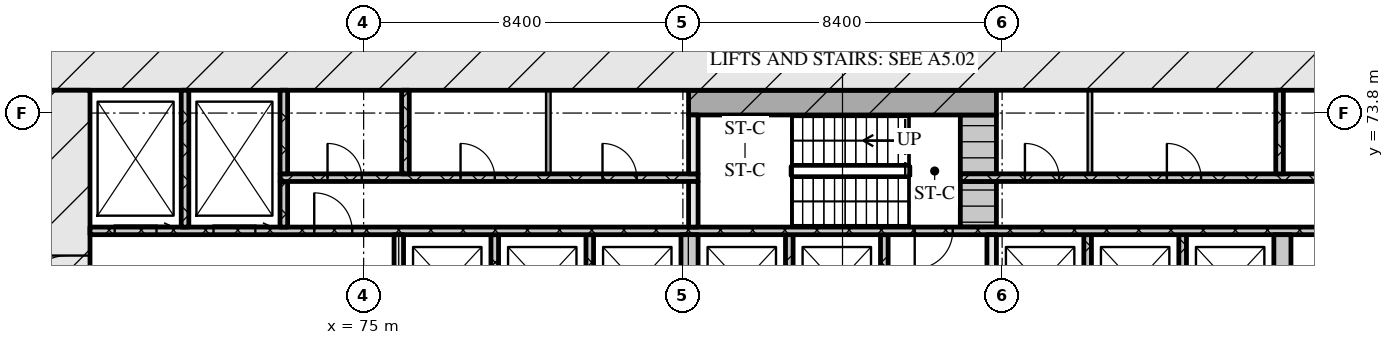
"""IFC4 building model, lengths in metres.
Left out: names, types, materials, properties, quantities, classifications, styles, units other than length and angle.
Written with IfcOpenShell. Run it as: python <this file> out.ifc"""

import sys

from ifc_helpers import new_model, si_unit, direction, frame, frame_2d, origin, place, context, subcontext, project, spatial, rectangle, extrude, element, fill, save


model = new_model("IFC4")
c1 = context("Model", 3, precision=1e-05, world=origin(), true_north=direction((0.0, 1.0)))
c2 = subcontext(c1, "Body", "Model", "MODEL_VIEW")
j1 = project(units=[si_unit("LENGTHUNIT", "METRE"), si_unit("PLANEANGLEUNIT", "RADIAN")], contexts=[c1])
p1 = place(None, origin())
s1 = spatial("IfcSite", under=j1, at=p1, CompositionType="ELEMENT")
p2 = place(p1, origin())
s2 = spatial("IfcBuilding", under=s1, at=p2, CompositionType="ELEMENT")
p3 = place(p2, origin())
s3 = spatial("IfcBuildingStorey", under=s2, at=p3, CompositionType="ELEMENT", Elevation=0.0)
p4 = place(p3, frame((66.6, 75.0, 0.0), z_axis=(0.0, 0.0, 1.0), x_axis=(1.0, 0.0, 0.0)))
e1 = element("IfcWall", 1, at=p4, inside=s3, PredefinedType="SOLIDWALL", context=c2, shape_type="SweptSolid", body=[
    extrude(rectangle(XDim=42.0, YDim=1.2, at=frame_2d((21.0, 0.0))), origin(), (0.0, 0.0, 1.0), 8.7),
])
p5 = place(p3, frame((67.2, 62.4, 0.0), z_axis=(0.0, 0.0, 1.0), x_axis=(0.0, 1.0, 0.0)))
e2 = element("IfcWall", 2, at=p5, inside=s3, PredefinedType="SOLIDWALL", context=c2, shape_type="SweptSolid", body=[
    extrude(rectangle(XDim=12.0, YDim=1.2, at=frame_2d((6.0, 0.0))), origin(), (0.0, 0.0, 1.0), 8.7),
])
p6 = place(p5, frame((6.45, 0.0, 0.0)))
e3 = element("IfcOpeningElement", 3, at=p6, cuts=e2, PredefinedType="OPENING", context=c2, shape_type="SweptSolid", body=[
    extrude(rectangle(XDim=1.2, YDim=2.1, at=frame_2d((0.6, 1.05))), frame((0.0, 0.61, 0.0), z_axis=(0.0, -1.0, 0.0), x_axis=(1.0, 0.0, 0.0)), (0.0, 0.0, 1.0), 1.22),
])
for number, where, z_axis, x_axis in (
    (4, (78.45, 68.0, 0.0), (0.0, 0.0, 1.0), (0.0, 1.0, 0.0)),
    (5, (80.95, 68.0, 0.0), (0.0, 0.0, 1.0), (0.0, 1.0, 0.0)),
):
    element("IfcWall", number, at=place(p3, frame(where, z_axis=z_axis, x_axis=x_axis)), inside=s3, PredefinedType="SOLIDWALL", context=c2, shape_type="SweptSolid", body=[
        extrude(rectangle(XDim=2.6, YDim=0.2, at=frame_2d((1.3, 0.0))), origin(), (0.0, 0.0, 1.0), 8.7),
    ])
p7 = place(p3, frame((83.575, 68.0, 0.0), z_axis=(0.0, 0.0, 1.0), x_axis=(0.0, 1.0, 0.0)))
e6 = element("IfcWall", 6, at=p7, inside=s3, PredefinedType="SOLIDWALL", context=c2, shape_type="SweptSolid", body=[
    extrude(rectangle(XDim=2.6, YDim=0.45, at=frame_2d((1.3, 0.0))), origin(), (0.0, 0.0, 1.0), 8.7),
])
for number, where, z_axis, x_axis in (
    (7, (86.2, 68.0, 0.0), (0.0, 0.0, 1.0), (0.0, 1.0, 0.0)),
    (8, (88.7, 68.0, 0.0), (0.0, 0.0, 1.0), (0.0, 1.0, 0.0)),
):
    element("IfcWall", number, at=place(p3, frame(where, z_axis=z_axis, x_axis=x_axis)), inside=s3, PredefinedType="SOLIDWALL", context=c2, shape_type="SweptSolid", body=[
        extrude(rectangle(XDim=2.6, YDim=0.2, at=frame_2d((1.3, 0.0))), origin(), (0.0, 0.0, 1.0), 8.7),
    ])
p8 = place(p3, frame((91.525, 68.0, 0.0), z_axis=(0.0, 0.0, 1.0), x_axis=(0.0, 1.0, 0.0)))
e9 = element("IfcWall", 9, at=p8, inside=s3, PredefinedType="SOLIDWALL", context=c2, shape_type="SweptSolid", body=[
    extrude(rectangle(XDim=2.6, YDim=0.25, at=frame_2d((1.3, 0.0))), origin(), (0.0, 0.0, 1.0), 8.7),
])
for number, where, z_axis, x_axis in (
    (10, (94.05, 68.0, 0.0), (0.0, 0.0, 1.0), (0.0, 1.0, 0.0)),
    (11, (96.55, 68.0, 0.0), (0.0, 0.0, 1.0), (0.0, 1.0, 0.0)),
):
    element("IfcWall", number, at=place(p3, frame(where, z_axis=z_axis, x_axis=x_axis)), inside=s3, PredefinedType="SOLIDWALL", context=c2, shape_type="SweptSolid", body=[
        extrude(rectangle(XDim=2.6, YDim=0.2, at=frame_2d((1.3, 0.0))), origin(), (0.0, 0.0, 1.0), 8.7),
    ])
p9 = place(p3, frame((75.925, 68.3, 0.0), z_axis=(0.0, 0.0, 1.0), x_axis=(0.0, 1.0, 0.0)))
e12 = element("IfcWall", 12, at=p9, inside=s3, PredefinedType="SOLIDWALL", context=c2, shape_type="SweptSolid", body=[
    extrude(rectangle(XDim=2.3, YDim=0.25, at=frame_2d((1.15, 0.0))), origin(), (0.0, 0.0, 1.0), 8.7),
])
p10 = place(p3, frame((99.175, 68.3, 0.0), z_axis=(0.0, 0.0, 1.0), x_axis=(0.0, 1.0, 0.0)))
e13 = element("IfcWall", 13, at=p10, inside=s3, PredefinedType="SOLIDWALL", context=c2, shape_type="SweptSolid", body=[
    extrude(rectangle(XDim=2.3, YDim=0.45, at=frame_2d((1.15, 0.0))), origin(), (0.0, 0.0, 1.0), 8.7),
])
p11 = place(p3, frame((67.8, 70.7, 0.0), z_axis=(0.0, 0.0, 1.0), x_axis=(1.0, 0.0, 0.0)))
e14 = element("IfcWall", 14, at=p11, inside=s3, PredefinedType="SOLIDWALL", context=c2, shape_type="SweptSolid", body=[
    extrude(rectangle(XDim=39.6, YDim=0.2, at=frame_2d((19.8, 0.0))), origin(), (0.0, 0.0, 1.0), 8.7),
])
p12 = place(p11, frame((0.65, 0.0, 0.0)))
e15 = element("IfcOpeningElement", 15, at=p12, cuts=e14, PredefinedType="OPENING", context=c2, shape_type="SweptSolid", body=[
    extrude(rectangle(XDim=1.1, YDim=2.1, at=frame_2d((0.55, 1.05))), frame((0.0, 0.11, 0.0), z_axis=(0.0, -1.0, 0.0), x_axis=(1.0, 0.0, 0.0)), (0.0, 0.0, 1.0), 0.22),
])
p13 = place(p11, frame((3.25, 0.0, 0.0)))
e16 = element("IfcOpeningElement", 16, at=p13, cuts=e14, PredefinedType="OPENING", context=c2, shape_type="SweptSolid", body=[
    extrude(rectangle(XDim=1.1, YDim=2.1, at=frame_2d((0.55, 1.05))), frame((0.0, 0.11, 0.0), z_axis=(0.0, -1.0, 0.0), x_axis=(1.0, 0.0, 0.0)), (0.0, 0.0, 1.0), 0.22),
])
p14 = place(p11, frame((5.9, 0.0, 0.0)))
e17 = element("IfcOpeningElement", 17, at=p14, cuts=e14, PredefinedType="OPENING", context=c2, shape_type="SweptSolid", body=[
    extrude(rectangle(XDim=1.0, YDim=2.1, at=frame_2d((0.5, 1.05))), frame((0.0, 0.11, 0.0), z_axis=(0.0, -1.0, 0.0), x_axis=(1.0, 0.0, 0.0)), (0.0, 0.0, 1.0), 0.22),
])
p15 = place(p11, frame((21.7, 0.0, 0.0)))
e18 = element("IfcOpeningElement", 18, at=p15, cuts=e14, PredefinedType="OPENING", context=c2, shape_type="SweptSolid", body=[
    extrude(rectangle(XDim=1.0, YDim=2.1, at=frame_2d((0.5, 1.05))), frame((0.0, 0.11, 0.0), z_axis=(0.0, -1.0, 0.0), x_axis=(1.0, 0.0, 0.0)), (0.0, 0.0, 1.0), 0.22),
])
p16 = place(p11, frame((32.7, 0.0, 0.0)))
e19 = element("IfcOpeningElement", 19, at=p16, cuts=e14, PredefinedType="OPENING", context=c2, shape_type="SweptSolid", body=[
    extrude(rectangle(XDim=1.0, YDim=2.1, at=frame_2d((0.5, 1.05))), frame((0.0, 0.11, 0.0), z_axis=(0.0, -1.0, 0.0), x_axis=(1.0, 0.0, 0.0)), (0.0, 0.0, 1.0), 0.22),
])
p17 = place(p11, frame((35.25, 0.0, 0.0)))
e20 = element("IfcOpeningElement", 20, at=p17, cuts=e14, PredefinedType="OPENING", context=c2, shape_type="SweptSolid", body=[
    extrude(rectangle(XDim=1.1, YDim=2.1, at=frame_2d((0.55, 1.05))), frame((0.0, 0.11, 0.0), z_axis=(0.0, -1.0, 0.0), x_axis=(1.0, 0.0, 0.0)), (0.0, 0.0, 1.0), 0.22),
])
p18 = place(p11, frame((37.85, 0.0, 0.0)))
e21 = element("IfcOpeningElement", 21, at=p18, cuts=e14, PredefinedType="OPENING", context=c2, shape_type="SweptSolid", body=[
    extrude(rectangle(XDim=1.1, YDim=2.1, at=frame_2d((0.55, 1.05))), frame((0.0, 0.11, 0.0), z_axis=(0.0, -1.0, 0.0), x_axis=(1.0, 0.0, 0.0)), (0.0, 0.0, 1.0), 0.22),
])
p19 = place(p3, frame((70.3, 70.8, 0.0), z_axis=(0.0, 0.0, 1.0), x_axis=(0.0, 1.0, 0.0)))
e22 = element("IfcWall", 22, at=p19, inside=s3, PredefinedType="SOLIDWALL", context=c2, shape_type="SweptSolid", body=[
    extrude(rectangle(XDim=3.6, YDim=0.2, at=frame_2d((1.8, 0.0))), origin(), (0.0, 0.0, 1.0), 8.7),
])
p20 = place(p3, frame((72.9, 70.8, 0.0), z_axis=(0.0, 0.0, 1.0), x_axis=(0.0, 1.0, 0.0)))
e23 = element("IfcWall", 23, at=p20, inside=s3, PredefinedType="SOLIDWALL", context=c2, shape_type="SweptSolid", body=[
    extrude(rectangle(XDim=1.2, YDim=0.2, at=frame_2d((0.6, 0.0))), origin(), (0.0, 0.0, 1.0), 8.7),
])
p21 = place(p3, frame((83.675, 70.8, 0.0), z_axis=(0.0, 0.0, 1.0), x_axis=(0.0, 1.0, 0.0)))
e24 = element("IfcWall", 24, at=p21, inside=s3, PredefinedType="SOLIDWALL", context=c2, shape_type="SweptSolid", body=[
    extrude(rectangle(XDim=1.2, YDim=0.25, at=frame_2d((0.6, 0.0))), origin(), (0.0, 0.0, 1.0), 8.7),
])
p22 = place(p3, frame((91.175, 70.8, 0.0), z_axis=(0.0, 0.0, 1.0), x_axis=(0.0, 1.0, 0.0)))
e25 = element("IfcWall", 25, at=p22, inside=s3, PredefinedType="SOLIDWALL", context=c2, shape_type="SweptSolid", body=[
    extrude(rectangle(XDim=1.2, YDim=0.95, at=frame_2d((0.6, 0.0))), origin(), (0.0, 0.0, 1.0), 8.7),
])
p23 = place(p3, frame((72.8, 72.1, 0.0), z_axis=(0.0, 0.0, 1.0), x_axis=(1.0, 0.0, 0.0)))
e26 = element("IfcWall", 26, at=p23, inside=s3, PredefinedType="SOLIDWALL", context=c2, shape_type="SweptSolid", body=[
    extrude(rectangle(XDim=11.0, YDim=0.2, at=frame_2d((5.5, 0.0))), origin(), (0.0, 0.0, 1.0), 8.7),
])
p24 = place(p23, frame((1.25, 0.0, 0.0)))
e27 = element("IfcOpeningElement", 27, at=p24, cuts=e26, PredefinedType="OPENING", context=c2, shape_type="SweptSolid", body=[
    extrude(rectangle(XDim=0.9, YDim=2.1, at=frame_2d((0.45, 1.05))), frame((0.0, 0.11, 0.0), z_axis=(0.0, -1.0, 0.0), x_axis=(1.0, 0.0, 0.0)), (0.0, 0.0, 1.0), 0.22),
])
p25 = place(p23, frame((4.75, 0.0, 0.0)))
e28 = element("IfcOpeningElement", 28, at=p25, cuts=e26, PredefinedType="OPENING", context=c2, shape_type="SweptSolid", body=[
    extrude(rectangle(XDim=0.9, YDim=2.1, at=frame_2d((0.45, 1.05))), frame((0.0, 0.11, 0.0), z_axis=(0.0, -1.0, 0.0), x_axis=(1.0, 0.0, 0.0)), (0.0, 0.0, 1.0), 0.22),
])
p26 = place(p23, frame((8.485, 0.0, 0.0)))
e29 = element("IfcOpeningElement", 29, at=p26, cuts=e26, PredefinedType="OPENING", context=c2, shape_type="SweptSolid", body=[
    extrude(rectangle(XDim=0.9, YDim=2.1, at=frame_2d((0.45, 1.05))), frame((0.0, 0.11, 0.0), z_axis=(0.0, -1.0, 0.0), x_axis=(1.0, 0.0, 0.0)), (0.0, 0.0, 1.0), 0.22),
])
p27 = place(p3, frame((90.7, 72.1, 0.0), z_axis=(0.0, 0.0, 1.0), x_axis=(1.0, 0.0, 0.0)))
e30 = element("IfcWall", 30, at=p27, inside=s3, PredefinedType="SOLIDWALL", context=c2, shape_type="SweptSolid", body=[
    extrude(rectangle(XDim=11.7, YDim=0.2, at=frame_2d((5.85, 0.0))), origin(), (0.0, 0.0, 1.0), 8.7),
])
p28 = place(p27, frame((1.7, 0.0, 0.0)))
e31 = element("IfcOpeningElement", 31, at=p28, cuts=e30, PredefinedType="OPENING", context=c2, shape_type="SweptSolid", body=[
    extrude(rectangle(XDim=0.9, YDim=2.1, at=frame_2d((0.45, 1.05))), frame((0.0, 0.11, 0.0), z_axis=(0.0, -1.0, 0.0), x_axis=(1.0, 0.0, 0.0)), (0.0, 0.0, 1.0), 0.22),
])
p29 = place(p27, frame((5.435, 0.0, 0.0)))
e32 = element("IfcOpeningElement", 32, at=p29, cuts=e30, PredefinedType="OPENING", context=c2, shape_type="SweptSolid", body=[
    extrude(rectangle(XDim=0.9, YDim=2.1, at=frame_2d((0.45, 1.05))), frame((0.0, 0.11, 0.0), z_axis=(0.0, -1.0, 0.0), x_axis=(1.0, 0.0, 0.0)), (0.0, 0.0, 1.0), 0.22),
])
p30 = place(p27, frame((9.55, 0.0, 0.0)))
e33 = element("IfcOpeningElement", 33, at=p30, cuts=e30, PredefinedType="OPENING", context=c2, shape_type="SweptSolid", body=[
    extrude(rectangle(XDim=0.9, YDim=2.1, at=frame_2d((0.45, 1.05))), frame((0.0, 0.11, 0.0), z_axis=(0.0, -1.0, 0.0), x_axis=(1.0, 0.0, 0.0)), (0.0, 0.0, 1.0), 0.22),
])
for number, where, z_axis, x_axis in (
    (34, (72.9, 72.2, 0.0), (0.0, 0.0, 1.0), (0.0, 1.0, 0.0)),
    (35, (76.1, 72.2, 0.0), (0.0, 0.0, 1.0), (0.0, 1.0, 0.0)),
):
    element("IfcWall", number, at=place(p3, frame(where, z_axis=z_axis, x_axis=x_axis)), inside=s3, PredefinedType="SOLIDWALL", context=c2, shape_type="SweptSolid", body=[
        extrude(rectangle(XDim=2.2, YDim=0.2, at=frame_2d((1.1, 0.0))), origin(), (0.0, 0.0, 1.0), 8.7),
    ])
p31 = place(p3, frame((79.86, 72.2, 0.0), z_axis=(0.0, 0.0, 1.0), x_axis=(0.0, 1.0, 0.0)))
e36 = element("IfcWall", 36, at=p31, inside=s3, PredefinedType="PARTITIONING", context=c2, shape_type="SweptSolid", body=[
    extrude(rectangle(XDim=2.2, YDim=0.12, at=frame_2d((1.1, 0.0))), origin(), (0.0, 0.0, 1.0), 8.7),
])
p32 = place(p3, frame((83.675, 72.2, 0.0), z_axis=(0.0, 0.0, 1.0), x_axis=(0.0, 1.0, 0.0)))
e37 = element("IfcWall", 37, at=p32, inside=s3, PredefinedType="SOLIDWALL", context=c2, shape_type="SweptSolid", body=[
    extrude(rectangle(XDim=1.55, YDim=0.25, at=frame_2d((0.775, 0.0))), origin(), (0.0, 0.0, 1.0), 8.7),
])
p33 = place(p3, frame((91.175, 72.2, 0.0), z_axis=(0.0, 0.0, 1.0), x_axis=(0.0, 1.0, 0.0)))
e38 = element("IfcWall", 38, at=p33, inside=s3, PredefinedType="SOLIDWALL", context=c2, shape_type="SweptSolid", body=[
    extrude(rectangle(XDim=1.55, YDim=0.95, at=frame_2d((0.775, 0.0))), origin(), (0.0, 0.0, 1.0), 8.7),
])
p34 = place(p3, frame((94.11, 72.2, 0.0), z_axis=(0.0, 0.0, 1.0), x_axis=(0.0, 1.0, 0.0)))
e39 = element("IfcWall", 39, at=p34, inside=s3, PredefinedType="PARTITIONING", context=c2, shape_type="SweptSolid", body=[
    extrude(rectangle(XDim=2.2, YDim=0.12, at=frame_2d((1.1, 0.0))), origin(), (0.0, 0.0, 1.0), 8.7),
])
p35 = place(p3, frame((99.1, 72.2, 0.0), z_axis=(0.0, 0.0, 1.0), x_axis=(0.0, 1.0, 0.0)))
e40 = element("IfcWall", 40, at=p35, inside=s3, PredefinedType="SOLIDWALL", context=c2, shape_type="SweptSolid", body=[
    extrude(rectangle(XDim=2.2, YDim=0.2, at=frame_2d((1.1, 0.0))), origin(), (0.0, 0.0, 1.0), 8.7),
])
p36 = place(p3, frame((83.55, 74.075, 0.0), z_axis=(0.0, 0.0, 1.0), x_axis=(1.0, 0.0, 0.0)))
e41 = element("IfcWall", 41, at=p36, inside=s3, PredefinedType="SOLIDWALL", context=c2, shape_type="SweptSolid", body=[
    extrude(rectangle(XDim=8.1, YDim=0.65, at=frame_2d((4.05, 0.0))), origin(), (0.0, 0.0, 1.0), 8.7),
])
p37 = place(p6, origin())
e42 = element("IfcDoor", 42, at=p37, inside=s3, OperationType="SINGLE_SWING_LEFT", PredefinedType="DOOR", context=c2, shape_type="SweptSolid", body=[
    extrude(rectangle(XDim=1.2, YDim=2.1, at=frame_2d((0.6, 1.05))), frame((0.0, 0.025, 0.0), z_axis=(0.0, -1.0, 0.0), x_axis=(1.0, 0.0, 0.0)), (0.0, 0.0, 1.0), 0.05),
])
fill(e3, e42)
p38 = place(p12, origin())
e43 = element("IfcDoor", 43, at=p38, inside=s3, OperationType="SLIDING_TO_RIGHT", PredefinedType="DOOR", context=c2, shape_type="SweptSolid", body=[
    extrude(rectangle(XDim=1.1, YDim=2.1, at=frame_2d((0.55, 1.05))), frame((0.0, 0.025, 0.0), z_axis=(0.0, -1.0, 0.0), x_axis=(1.0, 0.0, 0.0)), (0.0, 0.0, 1.0), 0.05),
])
fill(e15, e43)
p39 = place(p13, origin())
e44 = element("IfcDoor", 44, at=p39, inside=s3, OperationType="SLIDING_TO_RIGHT", PredefinedType="DOOR", context=c2, shape_type="SweptSolid", body=[
    extrude(rectangle(XDim=1.1, YDim=2.1, at=frame_2d((0.55, 1.05))), frame((0.0, 0.025, 0.0), z_axis=(0.0, -1.0, 0.0), x_axis=(1.0, 0.0, 0.0)), (0.0, 0.0, 1.0), 0.05),
])
fill(e16, e44)
p40 = place(p14, origin())
e45 = element("IfcDoor", 45, at=p40, inside=s3, OperationType="SINGLE_SWING_LEFT", PredefinedType="DOOR", context=c2, shape_type="SweptSolid", body=[
    extrude(rectangle(XDim=1.0, YDim=2.1, at=frame_2d((0.5, 1.05))), frame((0.0, 0.025, 0.0), z_axis=(0.0, -1.0, 0.0), x_axis=(1.0, 0.0, 0.0)), (0.0, 0.0, 1.0), 0.05),
])
fill(e17, e45)
p41 = place(p15, origin())
e46 = element("IfcDoor", 46, at=p41, inside=s3, OperationType="SINGLE_SWING_RIGHT", PredefinedType="DOOR", context=c2, shape_type="SweptSolid", body=[
    extrude(rectangle(XDim=1.0, YDim=2.1, at=frame_2d((0.5, 1.05))), frame((0.0, 0.025, 0.0), z_axis=(0.0, -1.0, 0.0), x_axis=(1.0, 0.0, 0.0)), (0.0, 0.0, 1.0), 0.05),
])
fill(e18, e46)
p42 = place(p24, origin())
e47 = element("IfcDoor", 47, at=p42, inside=s3, OperationType="SINGLE_SWING_LEFT", PredefinedType="DOOR", context=c2, shape_type="SweptSolid", body=[
    extrude(rectangle(XDim=0.9, YDim=2.1, at=frame_2d((0.45, 1.05))), frame((0.0, 0.025, 0.0), z_axis=(0.0, -1.0, 0.0), x_axis=(1.0, 0.0, 0.0)), (0.0, 0.0, 1.0), 0.05),
])
fill(e27, e47)
p43 = place(p25, origin())
e48 = element("IfcDoor", 48, at=p43, inside=s3, OperationType="SINGLE_SWING_LEFT", PredefinedType="DOOR", context=c2, shape_type="SweptSolid", body=[
    extrude(rectangle(XDim=0.9, YDim=2.1, at=frame_2d((0.45, 1.05))), frame((0.0, 0.025, 0.0), z_axis=(0.0, -1.0, 0.0), x_axis=(1.0, 0.0, 0.0)), (0.0, 0.0, 1.0), 0.05),
])
fill(e28, e48)
p44 = place(p26, origin())
e49 = element("IfcDoor", 49, at=p44, inside=s3, OperationType="SINGLE_SWING_LEFT", PredefinedType="DOOR", context=c2, shape_type="SweptSolid", body=[
    extrude(rectangle(XDim=0.9, YDim=2.1, at=frame_2d((0.45, 1.05))), frame((0.0, 0.025, 0.0), z_axis=(0.0, -1.0, 0.0), x_axis=(1.0, 0.0, 0.0)), (0.0, 0.0, 1.0), 0.05),
])
fill(e29, e49)
p45 = place(p28, origin())
e50 = element("IfcDoor", 50, at=p45, inside=s3, OperationType="SINGLE_SWING_LEFT", PredefinedType="DOOR", context=c2, shape_type="SweptSolid", body=[
    extrude(rectangle(XDim=0.9, YDim=2.1, at=frame_2d((0.45, 1.05))), frame((0.0, 0.025, 0.0), z_axis=(0.0, -1.0, 0.0), x_axis=(1.0, 0.0, 0.0)), (0.0, 0.0, 1.0), 0.05),
])
fill(e31, e50)
p46 = place(p29, origin())
e51 = element("IfcDoor", 51, at=p46, inside=s3, OperationType="SINGLE_SWING_LEFT", PredefinedType="DOOR", context=c2, shape_type="SweptSolid", body=[
    extrude(rectangle(XDim=0.9, YDim=2.1, at=frame_2d((0.45, 1.05))), frame((0.0, 0.025, 0.0), z_axis=(0.0, -1.0, 0.0), x_axis=(1.0, 0.0, 0.0)), (0.0, 0.0, 1.0), 0.05),
])
fill(e32, e51)
save(model, sys.argv[1])
